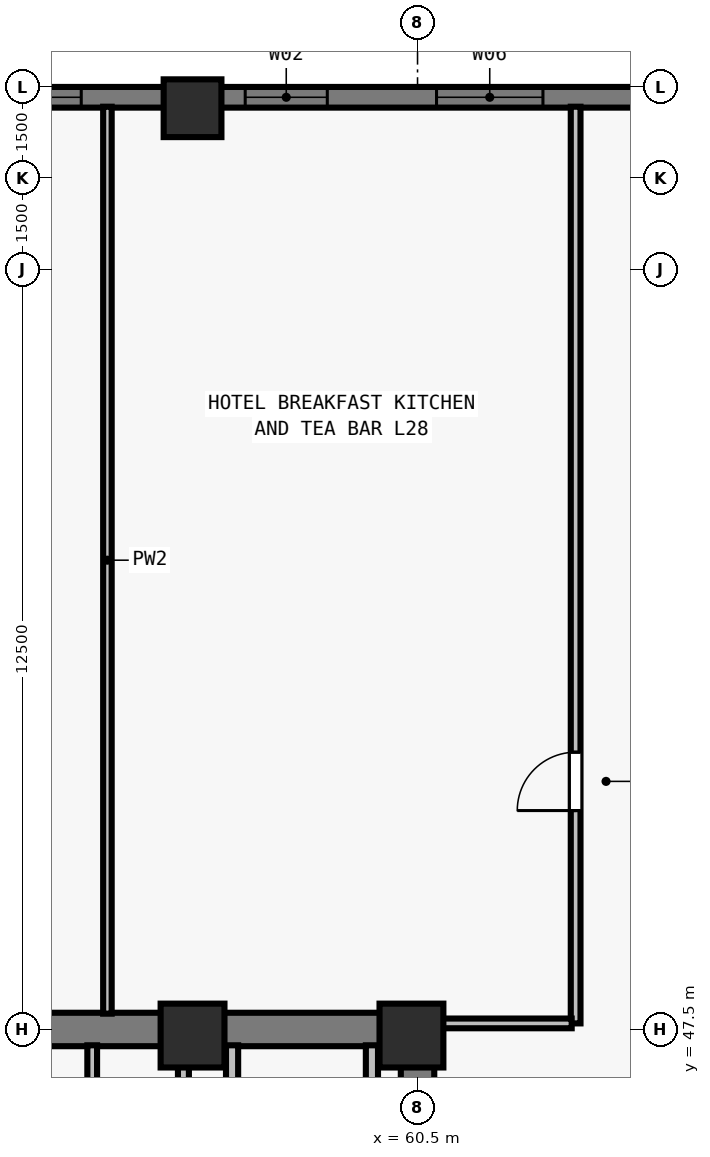
"""IFC4 building model, lengths in metres.
Left out: names, types, materials, properties, quantities, classifications, styles, units other than length and angle.
Written with IfcOpenShell. Run it as: python <this file> out.ifc"""

import sys

from ifc_helpers import new_model, si_unit, direction, frame, frame_2d, origin, origin_2d, place, context, subcontext, project, spatial, rectangle, extrude, element, fill, save


model = new_model("IFC4")
c1 = context("Model", 3, precision=1e-05, world=origin(), true_north=direction((0.0, 1.0)))
c2 = subcontext(c1, "Body", "Model", "MODEL_VIEW")
j1 = project(units=[si_unit("LENGTHUNIT", "METRE"), si_unit("PLANEANGLEUNIT", "RADIAN")], contexts=[c1])
p1 = place(None, origin())
s1 = spatial("IfcSite", under=j1, at=p1, CompositionType="ELEMENT")
p2 = place(p1, origin())
s2 = spatial("IfcBuilding", under=s1, at=p2, CompositionType="ELEMENT")
p3 = place(p2, frame((0.0, 0.0, 106.0)))
s3 = spatial("IfcBuildingStorey", under=s2, at=p3, CompositionType="ELEMENT", Elevation=106.0)
for number, where, z_axis, x_axis in (
    (1, (56.8, 47.4, 0.0), (0.0, 0.0, 1.0), (1.0, 0.0, 0.0)),
    (2, (60.4, 47.4, 0.0), (0.0, 0.0, 1.0), (1.0, 0.0, 0.0)),
):
    element("IfcColumn", number, at=place(p3, frame(where, z_axis=z_axis, x_axis=x_axis)), inside=s3, PredefinedType="COLUMN", context=c2, shape_type="SweptSolid", body=[
        extrude(rectangle(XDim=1.05, YDim=1.05, at=origin_2d()), origin(), (0.0, 0.0, 1.0), 3.5),
    ])
p4 = place(p3, frame((56.8, 62.65, 0.0), z_axis=(0.0, 0.0, 1.0), x_axis=(1.0, 0.0, 0.0)))
e3 = element("IfcColumn", 3, at=p4, inside=s3, PredefinedType="COLUMN", context=c2, shape_type="SweptSolid", body=[
    extrude(rectangle(XDim=0.95, YDim=0.95, at=origin_2d()), origin(), (0.0, 0.0, 1.0), 3.5),
])
p5 = place(p3, frame((45.0, 62.83, 0.0), z_axis=(0.0, 0.0, 1.0), x_axis=(1.0, 0.0, 0.0)))
e4 = element("IfcWall", 4, at=p5, inside=s3, PredefinedType="SOLIDWALL", context=c2, shape_type="SweptSolid", body=[
    extrude(rectangle(XDim=26.682, YDim=0.34, at=frame_2d((13.341, 0.0))), origin(), (0.0, 0.0, 1.0), 3.28),
])
p6 = place(p5, frame((5.073, 0.0, 0.8)))
e5 = element("IfcOpeningElement", 5, at=p6, cuts=e4, PredefinedType="OPENING", context=c2, shape_type="SweptSolid", body=[
    extrude(rectangle(XDim=1.35, YDim=1.66, at=frame_2d((0.675, 0.83))), frame((0.0, 0.18, 0.0), z_axis=(0.0, -1.0, 0.0), x_axis=(1.0, 0.0, 0.0)), (0.0, 0.0, 1.0), 0.36),
])
p7 = place(p5, frame((8.219, 0.0, 0.8)))
e6 = element("IfcOpeningElement", 6, at=p7, cuts=e4, PredefinedType="OPENING", context=c2, shape_type="SweptSolid", body=[
    extrude(rectangle(XDim=1.75, YDim=1.66, at=frame_2d((0.875, 0.83))), frame((0.0, 0.18, 0.0), z_axis=(0.0, -1.0, 0.0), x_axis=(1.0, 0.0, 0.0)), (0.0, 0.0, 1.0), 0.36),
])
p8 = place(p5, frame((12.666, 0.0, 0.8)))
e7 = element("IfcOpeningElement", 7, at=p8, cuts=e4, PredefinedType="OPENING", context=c2, shape_type="SweptSolid", body=[
    extrude(rectangle(XDim=1.35, YDim=1.66, at=frame_2d((0.675, 0.83))), frame((0.0, 0.18, 0.0), z_axis=(0.0, -1.0, 0.0), x_axis=(1.0, 0.0, 0.0)), (0.0, 0.0, 1.0), 0.36),
])
p9 = place(p5, frame((15.812, 0.0, 0.8)))
e8 = element("IfcOpeningElement", 8, at=p9, cuts=e4, PredefinedType="OPENING", context=c2, shape_type="SweptSolid", body=[
    extrude(rectangle(XDim=1.75, YDim=1.66, at=frame_2d((0.875, 0.83))), frame((0.0, 0.18, 0.0), z_axis=(0.0, -1.0, 0.0), x_axis=(1.0, 0.0, 0.0)), (0.0, 0.0, 1.0), 0.36),
])
p10 = place(p5, frame((20.709, 0.0, 0.8)))
e9 = element("IfcOpeningElement", 9, at=p10, cuts=e4, PredefinedType="OPENING", context=c2, shape_type="SweptSolid", body=[
    extrude(rectangle(XDim=1.35, YDim=1.66, at=frame_2d((0.675, 0.83))), frame((0.0, 0.18, 0.0), z_axis=(0.0, -1.0, 0.0), x_axis=(1.0, 0.0, 0.0)), (0.0, 0.0, 1.0), 0.36),
])
p11 = place(p3, frame((43.225, 47.5, 0.0), z_axis=(0.0, 0.0, 1.0), x_axis=(1.0, 0.0, 0.0)))
e10 = element("IfcWall", 10, at=p11, inside=s3, PredefinedType="SHEAR", context=c2, shape_type="SweptSolid", body=[
    extrude(rectangle(XDim=17.55, YDim=0.55, at=frame_2d((8.775, 0.0))), origin(), (0.0, 0.0, 1.0), 3.28),
])
p12 = place(p3, frame((60.5, 40.8, 0.0), z_axis=(0.0, 0.0, 1.0), x_axis=(0.0, 1.0, 0.0)))
e11 = element("IfcWall", 11, at=p12, inside=s3, PredefinedType="SHEAR", context=c2, shape_type="SweptSolid", body=[
    extrude(rectangle(XDim=6.435, YDim=0.55, at=frame_2d((3.218, 0.0))), origin(), (0.0, 0.0, 1.0), 3.28),
])
for number, where, z_axis, x_axis in (
    (12, (57.45, 43.735, 0.0), (0.0, 0.0, 1.0), (0.0, 1.0, 0.0)),
    (13, (59.75, 43.735, 0.0), (0.0, 0.0, 1.0), (0.0, 1.0, 0.0)),
):
    element("IfcWall", number, at=place(p3, frame(where, z_axis=z_axis, x_axis=x_axis)), inside=s3, PredefinedType="SOLIDWALL", context=c2, shape_type="SweptSolid", body=[
        extrude(rectangle(XDim=3.505, YDim=0.2, at=frame_2d((1.752, 0.0))), origin(), (0.0, 0.0, 1.0), 3.28),
    ])
p13 = place(p3, frame((56.65, 43.735, 0.0), z_axis=(0.0, 0.0, 1.0), x_axis=(0.0, 1.0, 0.0)))
e14 = element("IfcWall", 14, at=p13, inside=s3, PredefinedType="SOLIDWALL", context=c2, shape_type="SweptSolid", body=[
    extrude(rectangle(XDim=3.505, YDim=0.18, at=frame_2d((1.752, 0.0))), origin(), (0.0, 0.0, 1.0), 3.28),
])
p14 = place(p3, frame((55.15, 44.195, 0.0), z_axis=(0.0, 0.0, 1.0), x_axis=(0.0, 1.0, 0.0)))
e15 = element("IfcWall", 15, at=p14, inside=s3, PredefinedType="PARTITIONING", context=c2, shape_type="SweptSolid", body=[
    extrude(rectangle(XDim=3.045, YDim=0.16, at=frame_2d((1.522, 0.0))), origin(), (0.0, 0.0, 1.0), 3.28),
])
p15 = place(p14, frame((1.025, 0.0, 0.0)))
e16 = element("IfcOpeningElement", 16, at=p15, cuts=e15, PredefinedType="OPENING", context=c2, shape_type="SweptSolid", body=[
    extrude(rectangle(XDim=0.8, YDim=2.1, at=frame_2d((0.4, 1.05))), frame((0.0, 0.09, 0.0), z_axis=(0.0, -1.0, 0.0), x_axis=(1.0, 0.0, 0.0)), (0.0, 0.0, 1.0), 0.18),
])
p16 = place(p3, frame((63.1, 47.6, 0.0), z_axis=(0.0, 0.0, 1.0), x_axis=(0.0, 1.0, 0.0)))
e17 = element("IfcWall", 17, at=p16, inside=s3, PredefinedType="PARTITIONING", context=c2, shape_type="SweptSolid", body=[
    extrude(rectangle(XDim=15.075, YDim=0.16, at=frame_2d((7.538, 0.0))), origin(), (0.0, 0.0, 1.0), 2.555),
])
p17 = place(p16, frame((3.5, 0.0, 0.0)))
e18 = element("IfcOpeningElement", 18, at=p17, cuts=e17, PredefinedType="OPENING", context=c2, shape_type="SweptSolid", body=[
    extrude(rectangle(XDim=0.96, YDim=2.12, at=frame_2d((0.48, 1.06))), frame((0.0, 0.09, 0.0), z_axis=(0.0, -1.0, 0.0), x_axis=(1.0, 0.0, 0.0)), (0.0, 0.0, 1.0), 0.18),
])
p18 = place(p3, frame((60.765, 47.6, 0.0), z_axis=(0.0, 0.0, 1.0), x_axis=(1.0, 0.0, 0.0)))
e19 = element("IfcWall", 19, at=p18, inside=s3, PredefinedType="PARTITIONING", context=c2, shape_type="SweptSolid", body=[
    extrude(rectangle(XDim=2.27, YDim=0.16, at=frame_2d((1.135, 0.0))), origin(), (0.0, 0.0, 1.0), 3.28),
])
p19 = place(p3, frame((55.4, 47.76, 0.0), z_axis=(0.0, 0.0, 1.0), x_axis=(0.0, 1.0, 0.0)))
e20 = element("IfcWall", 20, at=p19, inside=s3, PredefinedType="PARTITIONING", context=c2, shape_type="SweptSolid", body=[
    extrude(rectangle(XDim=14.915, YDim=0.14, at=frame_2d((7.458, 0.0))), origin(), (0.0, 0.0, 1.0), 2.896),
])
p20 = place(p7, origin())
e21 = element("IfcWindow", 21, at=p20, inside=s3, PartitioningType="SINGLE_PANEL", PredefinedType="WINDOW", context=c2, shape_type="SweptSolid", body=[
    extrude(rectangle(XDim=1.75, YDim=1.66, at=frame_2d((0.875, 0.83))), frame((0.0, -0.05, 0.0), z_axis=(0.0, -1.0, 0.0), x_axis=(1.0, 0.0, 0.0)), (0.0, 0.0, 1.0), 0.06),
])
fill(e6, e21)
p21 = place(p8, origin())
e22 = element("IfcWindow", 22, at=p21, inside=s3, PartitioningType="SINGLE_PANEL", PredefinedType="WINDOW", context=c2, shape_type="SweptSolid", body=[
    extrude(rectangle(XDim=1.35, YDim=1.66, at=frame_2d((0.675, 0.83))), frame((0.0, -0.05, 0.0), z_axis=(0.0, -1.0, 0.0), x_axis=(1.0, 0.0, 0.0)), (0.0, 0.0, 1.0), 0.06),
])
fill(e7, e22)
p22 = place(p9, origin())
e23 = element("IfcWindow", 23, at=p22, inside=s3, PartitioningType="SINGLE_PANEL", PredefinedType="WINDOW", context=c2, shape_type="SweptSolid", body=[
    extrude(rectangle(XDim=1.75, YDim=1.66, at=frame_2d((0.875, 0.83))), frame((0.0, -0.05, 0.0), z_axis=(0.0, -1.0, 0.0), x_axis=(1.0, 0.0, 0.0)), (0.0, 0.0, 1.0), 0.06),
])
fill(e8, e23)
p23 = place(p17, origin())
e24 = element("IfcDoor", 24, at=p23, inside=s3, OperationType="SINGLE_SWING_LEFT", PredefinedType="DOOR", context=c2, shape_type="SweptSolid", body=[
    extrude(rectangle(XDim=0.96, YDim=2.12, at=frame_2d((0.48, 1.06))), frame((0.0, 0.025, 0.0), z_axis=(0.0, -1.0, 0.0), x_axis=(1.0, 0.0, 0.0)), (0.0, 0.0, 1.0), 0.05),
])
fill(e18, e24)
save(model, sys.argv[1])
